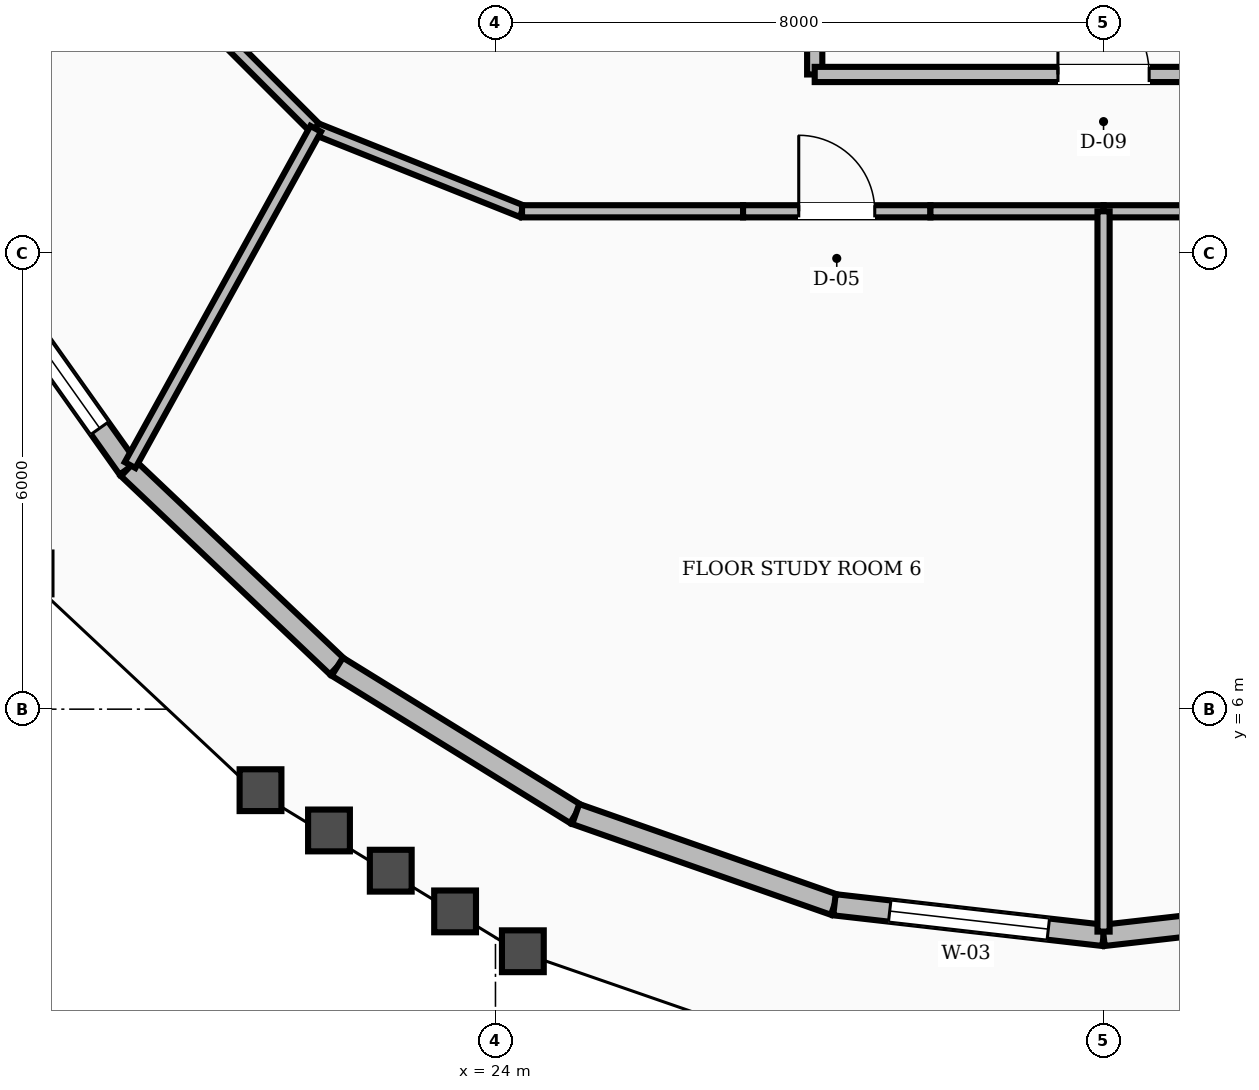
"""IFC4 building model, lengths in metres.
Left out: names, types, materials, properties, quantities, classifications, styles, units other than length and angle.
Written with IfcOpenShell. Run it as: python <this file> out.ifc"""

import sys

from ifc_helpers import new_model, si_unit, direction, frame, frame_2d, origin, place, context, subcontext, project, spatial, rectangle, extrude, element, fill, save


model = new_model("IFC4")
c1 = context("Model", 3, precision=1e-05, world=origin(), true_north=direction((0.0, 1.0)))
c2 = subcontext(c1, "Body", "Model", "MODEL_VIEW")
j1 = project(units=[si_unit("LENGTHUNIT", "METRE"), si_unit("PLANEANGLEUNIT", "RADIAN")], contexts=[c1])
p1 = place(None, origin())
s1 = spatial("IfcSite", under=j1, at=p1, CompositionType="ELEMENT")
p2 = place(p1, origin())
s2 = spatial("IfcBuilding", under=s1, at=p2, CompositionType="ELEMENT")
p3 = place(p2, frame((0.0, 0.0, 286.8)))
s3 = spatial("IfcBuildingStorey", under=s2, at=p3, CompositionType="ELEMENT", Elevation=286.8)
p4 = place(p3, frame((16.912, 12.346, 0.0), z_axis=(0.0, 0.0, 1.0), x_axis=(0.578913591695, -0.815388897, 0.0)))
e1 = element("IfcWall", 1, at=p4, inside=s3, PredefinedType="STANDARD", context=c2, shape_type="SweptSolid", body=[
    extrude(rectangle(XDim=3.898, YDim=0.28, at=frame_2d((1.949, 0.0))), origin(), (0.0, 0.0, 1.0), 2.88),
])
p5 = place(p4, frame((0.649, 0.0, 0.8)))
e2 = element("IfcOpeningElement", 2, at=p5, cuts=e1, PredefinedType="OPENING", context=c2, shape_type="SweptSolid", body=[
    extrude(rectangle(XDim=2.6, YDim=1.65, at=frame_2d((1.3, 0.825))), frame((0.0, 0.15, 0.0), z_axis=(0.0, -1.0, 0.0), x_axis=(1.0, 0.0, 0.0)), (0.0, 0.0, 1.0), 0.3),
])
p6 = place(p3, frame((19.169, 9.167, 0.0), z_axis=(0.0, 0.0, 1.0), x_axis=(0.725476892889, -0.688246524063, 0.0)))
e3 = element("IfcWall", 3, at=p6, inside=s3, PredefinedType="STANDARD", context=c2, shape_type="SweptSolid", body=[
    extrude(rectangle(XDim=3.79, YDim=0.28, at=frame_2d((1.895, 0.0))), origin(), (0.0, 0.0, 1.0), 2.88),
])
p7 = place(p3, frame((21.919, 6.559, 0.0), z_axis=(0.0, 0.0, 1.0), x_axis=(0.850702223814, -0.525647911057, 0.0)))
e4 = element("IfcWall", 4, at=p7, inside=s3, PredefinedType="STANDARD", context=c2, shape_type="SweptSolid", body=[
    extrude(rectangle(XDim=3.688, YDim=0.28, at=frame_2d((1.844, 0.0))), origin(), (0.0, 0.0, 1.0), 2.88),
])
p8 = place(p3, frame((25.056, 4.62, 0.0), z_axis=(0.0, 0.0, 1.0), x_axis=(0.94366932977, -0.33089000597, 0.0)))
e5 = element("IfcWall", 5, at=p8, inside=s3, PredefinedType="STANDARD", context=c2, shape_type="SweptSolid", body=[
    extrude(rectangle(XDim=3.607, YDim=0.28, at=frame_2d((1.804, 0.0))), origin(), (0.0, 0.0, 1.0), 2.88),
])
p9 = place(p3, frame((28.46, 3.427, 0.0), z_axis=(0.0, 0.0, 1.0), x_axis=(0.993580071332, -0.113131082605, 0.0)))
e6 = element("IfcWall", 6, at=p9, inside=s3, PredefinedType="STANDARD", context=c2, shape_type="SweptSolid", body=[
    extrude(rectangle(XDim=3.563, YDim=0.28, at=frame_2d((1.781, 0.0))), origin(), (0.0, 0.0, 1.0), 2.88),
])
p10 = place(p9, frame((0.731, 0.0, 0.8)))
e7 = element("IfcOpeningElement", 7, at=p10, cuts=e6, PredefinedType="OPENING", context=c2, shape_type="SweptSolid", body=[
    extrude(rectangle(XDim=2.1, YDim=1.65, at=frame_2d((1.05, 0.825))), frame((0.0, 0.15, 0.0), z_axis=(0.0, -1.0, 0.0), x_axis=(1.0, 0.0, 0.0)), (0.0, 0.0, 1.0), 0.3),
])
p11 = place(p3, frame((32.0, 3.024, 0.0), z_axis=(0.0, 0.0, 1.0), x_axis=(0.993580071332, 0.113131082605, 0.0)))
e8 = element("IfcWall", 8, at=p11, inside=s3, PredefinedType="STANDARD", context=c2, shape_type="SweptSolid", body=[
    extrude(rectangle(XDim=3.563, YDim=0.28, at=frame_2d((1.781, 0.0))), origin(), (0.0, 0.0, 1.0), 2.88),
])
p12 = place(p3, frame((28.2, 14.35, 0.0), z_axis=(0.0, 0.0, 1.0), x_axis=(0.0, 1.0, 0.0)))
e9 = element("IfcWall", 9, at=p12, inside=s3, PredefinedType="SOLIDWALL", context=c2, shape_type="SweptSolid", body=[
    extrude(rectangle(XDim=2.2, YDim=0.2, at=frame_2d((1.1, 0.0))), origin(), (0.0, 0.0, 1.0), 2.87),
])
p13 = place(p3, frame((28.2, 14.35, 0.0), z_axis=(0.0, 0.0, 1.0), x_axis=(1.0, 0.0, 0.0)))
e10 = element("IfcWall", 10, at=p13, inside=s3, PredefinedType="SOLIDWALL", context=c2, shape_type="SweptSolid", body=[
    extrude(rectangle(XDim=7.6, YDim=0.2, at=frame_2d((3.8, 0.0))), origin(), (0.0, 0.0, 1.0), 2.87),
])
p14 = place(p13, frame((3.2, 0.0, 0.0)))
e11 = element("IfcOpeningElement", 11, at=p14, cuts=e10, PredefinedType="OPENING", context=c2, shape_type="SweptSolid", body=[
    extrude(rectangle(XDim=1.2, YDim=2.1, at=frame_2d((0.6, 1.05))), frame((0.0, 0.11, 0.0), z_axis=(0.0, -1.0, 0.0), x_axis=(1.0, 0.0, 0.0)), (0.0, 0.0, 1.0), 0.22),
])
p15 = place(p3, frame((19.573, 15.697, 0.0), z_axis=(0.0, 0.0, 1.0), x_axis=(0.707106781187, -0.707106781187, 0.0)))
e12 = element("IfcWall", 12, at=p15, inside=s3, PredefinedType="SOLIDWALL", context=c2, shape_type="SweptSolid", body=[
    extrude(rectangle(XDim=2.916, YDim=0.16, at=frame_2d((1.458, 0.0))), origin(), (0.0, 0.0, 1.0), 2.87),
])
p16 = place(p3, frame((21.635, 13.635, 0.0), z_axis=(0.0, 0.0, 1.0), x_axis=(0.92856882165, -0.371160266542, 0.0)))
e13 = element("IfcWall", 13, at=p16, inside=s3, PredefinedType="SOLIDWALL", context=c2, shape_type="SweptSolid", body=[
    extrude(rectangle(XDim=2.923, YDim=0.16, at=frame_2d((1.461, 0.0))), origin(), (0.0, 0.0, 1.0), 2.87),
])
p17 = place(p3, frame((24.349, 12.55, 0.0), z_axis=(0.0, 0.0, 1.0), x_axis=(1.0, 0.0, 0.0)))
e14 = element("IfcWall", 14, at=p17, inside=s3, PredefinedType="SOLIDWALL", context=c2, shape_type="SweptSolid", body=[
    extrude(rectangle(XDim=2.908, YDim=0.16, at=frame_2d((1.454, 0.0))), origin(), (0.0, 0.0, 1.0), 2.87),
])
p18 = place(p3, frame((27.257, 12.55, 0.0), z_axis=(0.0, 0.0, 1.0), x_axis=(1.0, 0.0, 0.0)))
e15 = element("IfcWall", 15, at=p18, inside=s3, PredefinedType="SOLIDWALL", context=c2, shape_type="SweptSolid", body=[
    extrude(rectangle(XDim=2.465, YDim=0.16, at=frame_2d((1.232, 0.0))), origin(), (0.0, 0.0, 1.0), 2.87),
])
p19 = place(p18, frame((0.733, 0.0, 0.0)))
e16 = element("IfcOpeningElement", 16, at=p19, cuts=e15, PredefinedType="OPENING", context=c2, shape_type="SweptSolid", body=[
    extrude(rectangle(XDim=1.0, YDim=2.1, at=frame_2d((0.5, 1.05))), frame((0.0, 0.09, 0.0), z_axis=(0.0, -1.0, 0.0), x_axis=(1.0, 0.0, 0.0)), (0.0, 0.0, 1.0), 0.18),
])
for number, where, z_axis, x_axis in (
    (17, (29.722, 12.55, 0.0), (0.0, 0.0, 1.0), (1.0, 0.0, 0.0)),
    (18, (32.0, 12.55, 0.0), (0.0, 0.0, 1.0), (1.0, 0.0, 0.0)),
):
    element("IfcWall", number, at=place(p3, frame(where, z_axis=z_axis, x_axis=x_axis)), inside=s3, PredefinedType="SOLIDWALL", context=c2, shape_type="SweptSolid", body=[
        extrude(rectangle(XDim=2.278, YDim=0.16, at=frame_2d((1.139, 0.0))), origin(), (0.0, 0.0, 1.0), 2.87),
    ])
p20 = place(p3, frame((21.635, 13.635, 0.0), z_axis=(0.0, 0.0, 1.0), x_axis=(-0.483253595125, -0.875480418284, 0.0)))
e19 = element("IfcWall", 19, at=p20, inside=s3, PredefinedType="SOLIDWALL", context=c2, shape_type="SweptSolid", body=[
    extrude(rectangle(XDim=5.053, YDim=0.16, at=frame_2d((2.526, 0.0))), origin(), (0.0, 0.0, 1.0), 2.87),
])
p21 = place(p3, frame((32.0, 12.55, 0.0), z_axis=(0.0, 0.0, 1.0), x_axis=(0.0, -1.0, 0.0)))
e20 = element("IfcWall", 20, at=p21, inside=s3, PredefinedType="SOLIDWALL", context=c2, shape_type="SweptSolid", body=[
    extrude(rectangle(XDim=9.477, YDim=0.16, at=frame_2d((4.738, 0.0))), origin(), (0.0, 0.0, 1.0), 2.87),
])
p22 = place(p5, origin())
e21 = element("IfcWindow", 21, at=p22, inside=s3, PartitioningType="SINGLE_PANEL", PredefinedType="WINDOW", context=c2, shape_type="SweptSolid", body=[
    extrude(rectangle(XDim=2.6, YDim=1.65, at=frame_2d((1.3, 0.825))), frame((0.0, 0.03, 0.0), z_axis=(0.0, -1.0, 0.0), x_axis=(1.0, 0.0, 0.0)), (0.0, 0.0, 1.0), 0.06),
])
fill(e2, e21)
p23 = place(p10, origin())
e22 = element("IfcWindow", 22, at=p23, inside=s3, PartitioningType="SINGLE_PANEL", PredefinedType="WINDOW", context=c2, shape_type="SweptSolid", body=[
    extrude(rectangle(XDim=2.1, YDim=1.65, at=frame_2d((1.05, 0.825))), frame((0.0, 0.03, 0.0), z_axis=(0.0, -1.0, 0.0), x_axis=(1.0, 0.0, 0.0)), (0.0, 0.0, 1.0), 0.06),
])
fill(e7, e22)
p24 = place(p14, origin())
e23 = element("IfcDoor", 23, at=p24, inside=s3, OperationType="SINGLE_SWING_LEFT", PredefinedType="DOOR", context=c2, shape_type="SweptSolid", body=[
    extrude(rectangle(XDim=1.2, YDim=2.1, at=frame_2d((0.6, 1.05))), frame((0.0, 0.025, 0.0), z_axis=(0.0, -1.0, 0.0), x_axis=(1.0, 0.0, 0.0)), (0.0, 0.0, 1.0), 0.05),
])
fill(e11, e23)
p25 = place(p19, origin())
e24 = element("IfcDoor", 24, at=p25, inside=s3, OperationType="SINGLE_SWING_LEFT", PredefinedType="DOOR", context=c2, shape_type="SweptSolid", body=[
    extrude(rectangle(XDim=1.0, YDim=2.1, at=frame_2d((0.5, 1.05))), frame((0.0, 0.025, 0.0), z_axis=(0.0, -1.0, 0.0), x_axis=(1.0, 0.0, 0.0)), (0.0, 0.0, 1.0), 0.05),
])
fill(e16, e24)
save(model, sys.argv[1])
